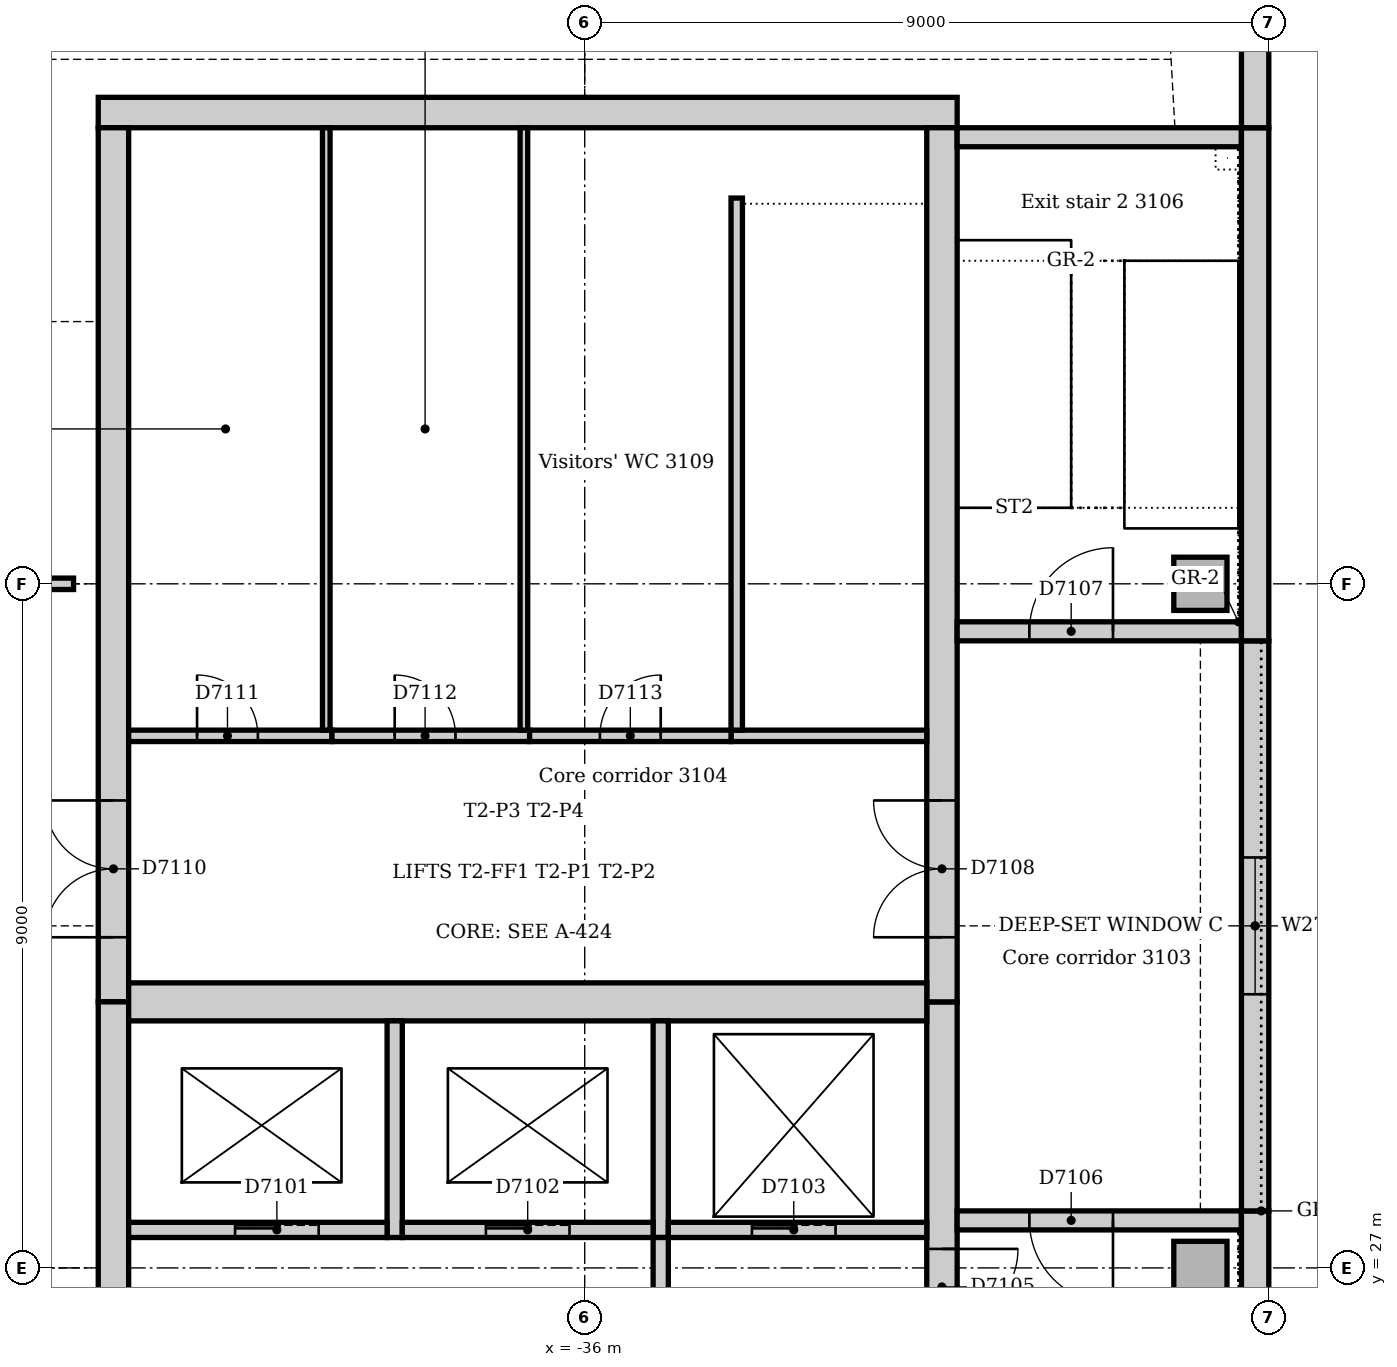
"""IFC4 building model, lengths in metres.
Left out: names, types, materials, properties, quantities, classifications, styles, units other than length and angle.
Written with IfcOpenShell. Run it as: python <this file> out.ifc"""

import sys

from ifc_helpers import new_model, si_unit, direction, frame, frame_2d, origin, origin_2d, place, context, subcontext, project, spatial, rectangle, extrude, element, fill, save


model = new_model("IFC4")
c1 = context("Model", 3, precision=1e-05, world=origin(), true_north=direction((0.0, 1.0)))
c2 = subcontext(c1, "Body", "Model", "MODEL_VIEW")
j1 = project(units=[si_unit("LENGTHUNIT", "METRE"), si_unit("PLANEANGLEUNIT", "RADIAN")], contexts=[c1])
p1 = place(None, origin())
s1 = spatial("IfcSite", under=j1, at=p1, CompositionType="ELEMENT")
p2 = place(p1, origin())
s2 = spatial("IfcBuilding", under=s1, at=p2, CompositionType="ELEMENT")
p3 = place(p2, frame((0.0, 0.0, 132.0)))
s3 = spatial("IfcBuildingStorey", under=s2, at=p3, CompositionType="ELEMENT", Elevation=132.0)
p4 = place(p3, frame((-31.1, 42.2, 0.0), z_axis=(0.0, 0.0, 1.0), x_axis=(-1.0, 0.0, 0.0)))
e1 = element("IfcWall", 1, at=p4, inside=s3, PredefinedType="SOLIDWALL", context=c2, shape_type="SweptSolid", body=[
    extrude(rectangle(XDim=11.3, YDim=0.4, at=frame_2d((5.65, 0.0))), origin(), (0.0, 0.0, 1.0), 4.0),
])
p5 = place(p3, frame((-31.3, 21.0, 0.0), z_axis=(0.0, 0.0, 1.0), x_axis=(0.0, 1.0, 0.0)))
e2 = element("IfcWall", 2, at=p5, inside=s3, PredefinedType="SOLIDWALL", context=c2, shape_type="SweptSolid", body=[
    extrude(rectangle(XDim=9.5, YDim=0.4, at=frame_2d((4.75, 0.0))), origin(), (0.0, 0.0, 1.0), 4.0),
])
p6 = place(p5, frame((5.25, 0.0, 0.0)))
e3 = element("IfcOpeningElement", 3, at=p6, cuts=e2, PredefinedType="OPENING", context=c2, shape_type="SweptSolid", body=[
    extrude(rectangle(XDim=1.0, YDim=2.1, at=frame_2d((0.5, 1.05))), frame((0.0, 0.21, 0.0), z_axis=(0.0, -1.0, 0.0), x_axis=(1.0, 0.0, 0.0)), (0.0, 0.0, 1.0), 0.42),
])
p7 = place(p3, frame((-31.3, 30.5, 0.0), z_axis=(0.0, 0.0, 1.0), x_axis=(0.0, 1.0, 0.0)))
e4 = element("IfcWall", 4, at=p7, inside=s3, PredefinedType="SOLIDWALL", context=c2, shape_type="SweptSolid", body=[
    extrude(rectangle(XDim=11.5, YDim=0.4, at=frame_2d((5.75, 0.0))), origin(), (0.0, 0.0, 1.0), 4.0),
])
p8 = place(p7, frame((0.85, 0.0, 0.0)))
e5 = element("IfcOpeningElement", 5, at=p8, cuts=e4, PredefinedType="OPENING", context=c2, shape_type="SweptSolid", body=[
    extrude(rectangle(XDim=1.8, YDim=2.1, at=frame_2d((0.9, 1.05))), frame((0.0, 0.21, 0.0), z_axis=(0.0, -1.0, 0.0), x_axis=(1.0, 0.0, 0.0)), (0.0, 0.0, 1.0), 0.42),
])
p9 = place(p3, frame((-42.2, 42.0, 0.0), z_axis=(0.0, 0.0, 1.0), x_axis=(0.0, -1.0, 0.0)))
e6 = element("IfcWall", 6, at=p9, inside=s3, PredefinedType="SOLIDWALL", context=c2, shape_type="SweptSolid", body=[
    extrude(rectangle(XDim=11.5, YDim=0.4, at=frame_2d((5.75, 0.0))), origin(), (0.0, 0.0, 1.0), 4.0),
])
p10 = place(p9, frame((8.85, 0.0, 0.0)))
e7 = element("IfcOpeningElement", 7, at=p10, cuts=e6, PredefinedType="OPENING", context=c2, shape_type="SweptSolid", body=[
    extrude(rectangle(XDim=1.8, YDim=2.1, at=frame_2d((0.9, 1.05))), frame((0.0, 0.21, 0.0), z_axis=(0.0, -1.0, 0.0), x_axis=(1.0, 0.0, 0.0)), (0.0, 0.0, 1.0), 0.42),
])
p11 = place(p3, frame((-42.2, 30.5, 0.0), z_axis=(0.0, 0.0, 1.0), x_axis=(0.0, -1.0, 0.0)))
e8 = element("IfcWall", 8, at=p11, inside=s3, PredefinedType="SOLIDWALL", context=c2, shape_type="SweptSolid", body=[
    extrude(rectangle(XDim=9.5, YDim=0.4, at=frame_2d((4.75, 0.0))), origin(), (0.0, 0.0, 1.0), 4.0),
])
p12 = place(p11, frame((3.85, 0.0, 0.0)))
e9 = element("IfcOpeningElement", 9, at=p12, cuts=e8, PredefinedType="OPENING", context=c2, shape_type="SweptSolid", body=[
    extrude(rectangle(XDim=1.8, YDim=2.1, at=frame_2d((0.9, 1.05))), frame((0.0, 0.21, 0.0), z_axis=(0.0, -1.0, 0.0), x_axis=(1.0, 0.0, 0.0)), (0.0, 0.0, 1.0), 0.42),
])
p13 = place(p3, frame((-42.0, 30.5, 0.0), z_axis=(0.0, 0.0, 1.0), x_axis=(1.0, 0.0, 0.0)))
e10 = element("IfcWall", 10, at=p13, inside=s3, PredefinedType="SOLIDWALL", context=c2, shape_type="SweptSolid", body=[
    extrude(rectangle(XDim=10.5, YDim=0.5, at=frame_2d((5.25, 0.0))), origin(), (0.0, 0.0, 1.0), 4.0),
])
p14 = place(p3, frame((-27.36, 27.625, 0.0), z_axis=(0.0, 0.0, 1.0), x_axis=(-1.0, 0.0, 0.0)))
e11 = element("IfcWall", 11, at=p14, inside=s3, PredefinedType="SOLIDWALL", context=c2, shape_type="SweptSolid", body=[
    extrude(rectangle(XDim=3.74, YDim=0.25, at=frame_2d((1.87, 0.0))), origin(), (0.0, 0.0, 1.0), 4.0),
])
p15 = place(p14, frame((1.69, 0.0, 0.0)))
e12 = element("IfcOpeningElement", 12, at=p15, cuts=e11, PredefinedType="OPENING", context=c2, shape_type="SweptSolid", body=[
    extrude(rectangle(XDim=1.1, YDim=2.1, at=frame_2d((0.55, 1.05))), frame((0.0, 0.135, 0.0), z_axis=(0.0, -1.0, 0.0), x_axis=(1.0, 0.0, 0.0)), (0.0, 0.0, 1.0), 0.27),
])
p16 = place(p3, frame((-31.1, 35.375, 0.0), z_axis=(0.0, 0.0, 1.0), x_axis=(1.0, 0.0, 0.0)))
e13 = element("IfcWall", 13, at=p16, inside=s3, PredefinedType="SOLIDWALL", context=c2, shape_type="SweptSolid", body=[
    extrude(rectangle(XDim=3.74, YDim=0.25, at=frame_2d((1.87, 0.0))), origin(), (0.0, 0.0, 1.0), 4.0),
])
p17 = place(p16, frame((0.95, 0.0, 0.0)))
e14 = element("IfcOpeningElement", 14, at=p17, cuts=e13, PredefinedType="OPENING", context=c2, shape_type="SweptSolid", body=[
    extrude(rectangle(XDim=1.1, YDim=2.1, at=frame_2d((0.55, 1.05))), frame((0.0, 0.135, 0.0), z_axis=(0.0, -1.0, 0.0), x_axis=(1.0, 0.0, 0.0)), (0.0, 0.0, 1.0), 0.27),
])
p18 = place(p3, frame((-27.36, 41.875, 0.0), z_axis=(0.0, 0.0, 1.0), x_axis=(-1.0, 0.0, 0.0)))
e15 = element("IfcWall", 15, at=p18, inside=s3, PredefinedType="SOLIDWALL", context=c2, shape_type="SweptSolid", body=[
    extrude(rectangle(XDim=3.74, YDim=0.25, at=frame_2d((1.87, 0.0))), origin(), (0.0, 0.0, 1.0), 4.0),
])
for number, where, z_axis, x_axis in (
    (16, (-27.9, 27.0, 0.0), (0.0, 0.0, 1.0), (1.0, 0.0, 0.0)),
    (17, (-27.9, 36.0, 0.0), (0.0, 0.0, 1.0), (1.0, 0.0, 0.0)),
):
    element("IfcColumn", number, at=place(p3, frame(where, z_axis=z_axis, x_axis=x_axis)), inside=s3, PredefinedType="COLUMN", context=c2, shape_type="SweptSolid", body=[
        extrude(rectangle(XDim=0.7, YDim=0.7, at=origin_2d()), origin(), (0.0, 0.0, 1.0), 4.0),
    ])
p19 = place(p3, frame((-27.18, 21.0, 0.0), z_axis=(0.0, 0.0, 1.0), x_axis=(0.0, 1.0, 0.0)))
e18 = element("IfcWall", 18, at=p19, inside=s3, PredefinedType="STANDARD", context=c2, shape_type="SweptSolid", body=[
    extrude(rectangle(XDim=6.75, YDim=0.36, at=frame_2d((3.375, 0.0))), origin(), (0.0, 0.0, 1.0), 3.85),
])
p20 = place(p3, frame((-27.18, 27.75, 0.0), z_axis=(0.0, 0.0, 1.0), x_axis=(0.0, 1.0, 0.0)))
e19 = element("IfcWall", 19, at=p20, inside=s3, PredefinedType="STANDARD", context=c2, shape_type="SweptSolid", body=[
    extrude(rectangle(XDim=7.5, YDim=0.36, at=frame_2d((3.75, 0.0))), origin(), (0.0, 0.0, 1.0), 3.85),
])
p21 = place(p20, frame((2.85, 0.0, 1.2)))
e20 = element("IfcOpeningElement", 20, at=p21, cuts=e19, PredefinedType="OPENING", context=c2, shape_type="SweptSolid", body=[
    extrude(rectangle(XDim=1.8, YDim=1.2, at=frame_2d((0.9, 0.6))), frame((0.0, 0.19, 0.0), z_axis=(0.0, -1.0, 0.0), x_axis=(1.0, 0.0, 0.0)), (0.0, 0.0, 1.0), 0.38),
])
p22 = place(p3, frame((-27.18, 35.25, 0.0), z_axis=(0.0, 0.0, 1.0), x_axis=(0.0, 1.0, 0.0)))
e21 = element("IfcWall", 21, at=p22, inside=s3, PredefinedType="STANDARD", context=c2, shape_type="SweptSolid", body=[
    extrude(rectangle(XDim=6.75, YDim=0.36, at=frame_2d((3.375, 0.0))), origin(), (0.0, 0.0, 1.0), 3.85),
])
p23 = place(p3, frame((-27.18, 42.0, 0.0), z_axis=(0.0, 0.0, 1.0), x_axis=(0.0, 1.0, 0.0)))
e22 = element("IfcWall", 22, at=p23, inside=s3, PredefinedType="STANDARD", context=c2, shape_type="SweptSolid", body=[
    extrude(rectangle(XDim=3.257, YDim=0.36, at=frame_2d((1.629, 0.0))), origin(), (0.0, 0.0, 1.0), 3.85),
])
p24 = place(p3, frame((-38.5, 27.4, 0.0), z_axis=(0.0, 0.0, 1.0), x_axis=(0.0, 1.0, 0.0)))
e23 = element("IfcWall", 23, at=p24, inside=s3, PredefinedType="SOLIDWALL", context=c2, shape_type="SweptSolid", body=[
    extrude(rectangle(XDim=2.85, YDim=0.2, at=frame_2d((1.425, 0.0))), origin(), (0.0, 0.0, 1.0), 4.0),
])
p25 = place(p3, frame((-42.0, 27.5, 0.0), z_axis=(0.0, 0.0, 1.0), x_axis=(1.0, 0.0, 0.0)))
e24 = element("IfcWall", 24, at=p25, inside=s3, PredefinedType="SOLIDWALL", context=c2, shape_type="SweptSolid", body=[
    extrude(rectangle(XDim=3.4, YDim=0.2, at=frame_2d((1.7, 0.0))), origin(), (0.0, 0.0, 1.0), 4.0),
])
p26 = place(p25, frame((1.4, 0.0, 0.0)))
e25 = element("IfcOpeningElement", 25, at=p26, cuts=e24, PredefinedType="OPENING", context=c2, shape_type="SweptSolid", body=[
    extrude(rectangle(XDim=1.1, YDim=2.1, at=frame_2d((0.55, 1.05))), frame((0.0, 0.11, 0.0), z_axis=(0.0, -1.0, 0.0), x_axis=(1.0, 0.0, 0.0)), (0.0, 0.0, 1.0), 0.22),
])
p27 = place(p3, frame((-35.0, 27.4, 0.0), z_axis=(0.0, 0.0, 1.0), x_axis=(0.0, 1.0, 0.0)))
e26 = element("IfcWall", 26, at=p27, inside=s3, PredefinedType="SOLIDWALL", context=c2, shape_type="SweptSolid", body=[
    extrude(rectangle(XDim=2.85, YDim=0.2, at=frame_2d((1.425, 0.0))), origin(), (0.0, 0.0, 1.0), 4.0),
])
p28 = place(p3, frame((-38.4, 27.5, 0.0), z_axis=(0.0, 0.0, 1.0), x_axis=(1.0, 0.0, 0.0)))
e27 = element("IfcWall", 27, at=p28, inside=s3, PredefinedType="SOLIDWALL", context=c2, shape_type="SweptSolid", body=[
    extrude(rectangle(XDim=3.3, YDim=0.2, at=frame_2d((1.65, 0.0))), origin(), (0.0, 0.0, 1.0), 4.0),
])
p29 = place(p28, frame((1.1, 0.0, 0.0)))
e28 = element("IfcOpeningElement", 28, at=p29, cuts=e27, PredefinedType="OPENING", context=c2, shape_type="SweptSolid", body=[
    extrude(rectangle(XDim=1.1, YDim=2.1, at=frame_2d((0.55, 1.05))), frame((0.0, 0.11, 0.0), z_axis=(0.0, -1.0, 0.0), x_axis=(1.0, 0.0, 0.0)), (0.0, 0.0, 1.0), 0.22),
])
p30 = place(p3, frame((-34.9, 27.5, 0.0), z_axis=(0.0, 0.0, 1.0), x_axis=(1.0, 0.0, 0.0)))
e29 = element("IfcWall", 29, at=p30, inside=s3, PredefinedType="SOLIDWALL", context=c2, shape_type="SweptSolid", body=[
    extrude(rectangle(XDim=3.4, YDim=0.2, at=frame_2d((1.7, 0.0))), origin(), (0.0, 0.0, 1.0), 4.0),
])
p31 = place(p30, frame((1.1, 0.0, 0.0)))
e30 = element("IfcOpeningElement", 30, at=p31, cuts=e29, PredefinedType="OPENING", context=c2, shape_type="SweptSolid", body=[
    extrude(rectangle(XDim=1.1, YDim=2.1, at=frame_2d((0.55, 1.05))), frame((0.0, 0.11, 0.0), z_axis=(0.0, -1.0, 0.0), x_axis=(1.0, 0.0, 0.0)), (0.0, 0.0, 1.0), 0.22),
])
p32 = place(p3, frame((-35.0, 24.1, 0.0), z_axis=(0.0, 0.0, 1.0), x_axis=(0.0, 1.0, 0.0)))
e31 = element("IfcWall", 31, at=p32, inside=s3, PredefinedType="SOLIDWALL", context=c2, shape_type="SweptSolid", body=[
    extrude(rectangle(XDim=3.3, YDim=0.2, at=frame_2d((1.65, 0.0))), origin(), (0.0, 0.0, 1.0), 4.0),
])
p33 = place(p32, frame((1.15, 0.0, 0.0)))
e32 = element("IfcOpeningElement", 32, at=p33, cuts=e31, PredefinedType="OPENING", context=c2, shape_type="SweptSolid", body=[
    extrude(rectangle(XDim=1.0, YDim=2.1, at=frame_2d((0.5, 1.05))), frame((0.0, 0.11, 0.0), z_axis=(0.0, -1.0, 0.0), x_axis=(1.0, 0.0, 0.0)), (0.0, 0.0, 1.0), 0.22),
])
p34 = place(p3, frame((-34.075, 34.0, 0.0), z_axis=(0.0, 0.0, 1.0), x_axis=(1.0, 0.0, 0.0)))
e33 = element("IfcWall", 33, at=p34, inside=s3, PredefinedType="SOLIDWALL", context=c2, shape_type="SweptSolid", body=[
    extrude(rectangle(XDim=2.575, YDim=0.15, at=frame_2d((1.288, 0.0))), origin(), (0.0, 0.0, 1.0), 4.0),
])
p35 = place(p3, frame((-34.0, 41.075, 0.0), z_axis=(0.0, 0.0, 1.0), x_axis=(0.0, -1.0, 0.0)))
e34 = element("IfcWall", 34, at=p35, inside=s3, PredefinedType="SOLIDWALL", context=c2, shape_type="SweptSolid", body=[
    extrude(rectangle(XDim=7.0, YDim=0.15, at=frame_2d((3.5, 0.0))), origin(), (0.0, 0.0, 1.0), 4.0),
])
p36 = place(p3, frame((-39.325, 34.0, 0.0), z_axis=(0.0, 0.0, 1.0), x_axis=(-1.0, 0.0, 0.0)))
e35 = element("IfcWall", 35, at=p36, inside=s3, PredefinedType="PARTITIONING", context=c2, shape_type="SweptSolid", body=[
    extrude(rectangle(XDim=2.675, YDim=0.15, at=frame_2d((1.337, 0.0))), origin(), (0.0, 0.0, 1.0), 3.85),
])
p37 = place(p36, frame((0.975, 0.0, 0.0)))
e36 = element("IfcOpeningElement", 36, at=p37, cuts=e35, PredefinedType="OPENING", context=c2, shape_type="SweptSolid", body=[
    extrude(rectangle(XDim=0.8, YDim=2.1, at=frame_2d((0.4, 1.05))), frame((0.0, 0.085, 0.0), z_axis=(0.0, -1.0, 0.0), x_axis=(1.0, 0.0, 0.0)), (0.0, 0.0, 1.0), 0.17),
])
p38 = place(p3, frame((-36.725, 34.0, 0.0), z_axis=(0.0, 0.0, 1.0), x_axis=(-1.0, 0.0, 0.0)))
e37 = element("IfcWall", 37, at=p38, inside=s3, PredefinedType="PARTITIONING", context=c2, shape_type="SweptSolid", body=[
    extrude(rectangle(XDim=2.6, YDim=0.15, at=frame_2d((1.3, 0.0))), origin(), (0.0, 0.0, 1.0), 3.85),
])
p39 = place(p38, frame((0.975, 0.0, 0.0)))
e38 = element("IfcOpeningElement", 38, at=p39, cuts=e37, PredefinedType="OPENING", context=c2, shape_type="SweptSolid", body=[
    extrude(rectangle(XDim=0.8, YDim=2.1, at=frame_2d((0.4, 1.05))), frame((0.0, 0.085, 0.0), z_axis=(0.0, -1.0, 0.0), x_axis=(1.0, 0.0, 0.0)), (0.0, 0.0, 1.0), 0.17),
])
p40 = place(p3, frame((-34.075, 34.0, 0.0), z_axis=(0.0, 0.0, 1.0), x_axis=(-1.0, 0.0, 0.0)))
e39 = element("IfcWall", 39, at=p40, inside=s3, PredefinedType="PARTITIONING", context=c2, shape_type="SweptSolid", body=[
    extrude(rectangle(XDim=2.65, YDim=0.15, at=frame_2d((1.325, 0.0))), origin(), (0.0, 0.0, 1.0), 3.85),
])
p41 = place(p40, frame((0.925, 0.0, 0.0)))
e40 = element("IfcOpeningElement", 40, at=p41, cuts=e39, PredefinedType="OPENING", context=c2, shape_type="SweptSolid", body=[
    extrude(rectangle(XDim=0.8, YDim=2.1, at=frame_2d((0.4, 1.05))), frame((0.0, 0.085, 0.0), z_axis=(0.0, -1.0, 0.0), x_axis=(1.0, 0.0, 0.0)), (0.0, 0.0, 1.0), 0.17),
])
for number, where, z_axis, x_axis in (
    (41, (-39.4, 34.075, 0.0), (0.0, 0.0, 1.0), (0.0, 1.0, 0.0)),
    (42, (-36.8, 34.075, 0.0), (0.0, 0.0, 1.0), (0.0, 1.0, 0.0)),
):
    element("IfcWall", number, at=place(p3, frame(where, z_axis=z_axis, x_axis=x_axis)), inside=s3, PredefinedType="PARTITIONING", context=c2, shape_type="SweptSolid", body=[
        extrude(rectangle(XDim=7.925, YDim=0.1, at=frame_2d((3.962, 0.0))), origin(), (0.0, 0.0, 1.0), 3.85),
    ])
p42 = place(p3, frame((-44.7, 36.0, 0.0), z_axis=(0.0, 0.0, 1.0), x_axis=(1.0, 0.0, 0.0)))
e43 = element("IfcWall", 43, at=p42, inside=s3, PredefinedType="PARTITIONING", context=c2, shape_type="SweptSolid", body=[
    extrude(rectangle(XDim=1.975, YDim=0.15, at=frame_2d((0.988, 0.0))), origin(), (0.0, 0.0, 1.0), 3.602),
])
p43 = place(p42, frame((0.55, 0.0, 0.0)))
e44 = element("IfcOpeningElement", 44, at=p43, cuts=e43, PredefinedType="OPENING", context=c2, shape_type="SweptSolid", body=[
    extrude(rectangle(XDim=0.9, YDim=2.1, at=frame_2d((0.45, 1.05))), frame((0.0, 0.085, 0.0), z_axis=(0.0, -1.0, 0.0), x_axis=(1.0, 0.0, 0.0)), (0.0, 0.0, 1.0), 0.17),
])
p44 = place(p21, origin())
e45 = element("IfcWindow", 45, at=p44, inside=s3, PartitioningType="SINGLE_PANEL", PredefinedType="WINDOW", context=c2, shape_type="SweptSolid", body=[
    extrude(rectangle(XDim=1.8, YDim=1.2, at=frame_2d((0.9, 0.6))), frame((0.0, 0.13, 0.0), z_axis=(0.0, -1.0, 0.0), x_axis=(1.0, 0.0, 0.0)), (0.0, 0.0, 1.0), 0.06),
])
fill(e20, e45)
p45 = place(p26, origin())
e46 = element("IfcDoor", 46, at=p45, inside=s3, OperationType="SLIDING_TO_LEFT", PredefinedType="DOOR", context=c2, shape_type="SweptSolid", body=[
    extrude(rectangle(XDim=1.1, YDim=2.1, at=frame_2d((0.55, 1.05))), frame((0.0, 0.025, 0.0), z_axis=(0.0, -1.0, 0.0), x_axis=(1.0, 0.0, 0.0)), (0.0, 0.0, 1.0), 0.05),
])
fill(e25, e46)
p46 = place(p29, origin())
e47 = element("IfcDoor", 47, at=p46, inside=s3, OperationType="SLIDING_TO_LEFT", PredefinedType="DOOR", context=c2, shape_type="SweptSolid", body=[
    extrude(rectangle(XDim=1.1, YDim=2.1, at=frame_2d((0.55, 1.05))), frame((0.0, 0.025, 0.0), z_axis=(0.0, -1.0, 0.0), x_axis=(1.0, 0.0, 0.0)), (0.0, 0.0, 1.0), 0.05),
])
fill(e28, e47)
p47 = place(p31, origin())
e48 = element("IfcDoor", 48, at=p47, inside=s3, OperationType="SLIDING_TO_LEFT", PredefinedType="DOOR", context=c2, shape_type="SweptSolid", body=[
    extrude(rectangle(XDim=1.1, YDim=2.1, at=frame_2d((0.55, 1.05))), frame((0.0, 0.025, 0.0), z_axis=(0.0, -1.0, 0.0), x_axis=(1.0, 0.0, 0.0)), (0.0, 0.0, 1.0), 0.05),
])
fill(e30, e48)
p48 = place(p6, frame((1.0, 0.0, 0.0), z_axis=(0.0, 0.0, 1.0), x_axis=(-1.0, 0.0, 0.0)))
e49 = element("IfcDoor", 49, at=p48, inside=s3, OperationType="SINGLE_SWING_LEFT", PredefinedType="DOOR", context=c2, shape_type="SweptSolid", body=[
    extrude(rectangle(XDim=1.0, YDim=2.1, at=frame_2d((0.5, 1.05))), frame((0.0, 0.025, 0.0), z_axis=(0.0, -1.0, 0.0), x_axis=(1.0, 0.0, 0.0)), (0.0, 0.0, 1.0), 0.05),
])
fill(e3, e49)
p49 = place(p15, origin())
e50 = element("IfcDoor", 50, at=p49, inside=s3, OperationType="SINGLE_SWING_LEFT", PredefinedType="DOOR", context=c2, shape_type="SweptSolid", body=[
    extrude(rectangle(XDim=1.1, YDim=2.1, at=frame_2d((0.55, 1.05))), frame((0.0, 0.025, 0.0), z_axis=(0.0, -1.0, 0.0), x_axis=(1.0, 0.0, 0.0)), (0.0, 0.0, 1.0), 0.05),
])
fill(e12, e50)
p50 = place(p17, origin())
e51 = element("IfcDoor", 51, at=p50, inside=s3, OperationType="SINGLE_SWING_RIGHT", PredefinedType="DOOR", context=c2, shape_type="SweptSolid", body=[
    extrude(rectangle(XDim=1.1, YDim=2.1, at=frame_2d((0.55, 1.05))), frame((0.0, 0.025, 0.0), z_axis=(0.0, -1.0, 0.0), x_axis=(1.0, 0.0, 0.0)), (0.0, 0.0, 1.0), 0.05),
])
fill(e14, e51)
p51 = place(p8, origin())
e52 = element("IfcDoor", 52, at=p51, inside=s3, OperationType="DOUBLE_DOOR_SINGLE_SWING", PredefinedType="DOOR", context=c2, shape_type="SweptSolid", body=[
    extrude(rectangle(XDim=1.8, YDim=2.1, at=frame_2d((0.9, 1.05))), frame((0.0, 0.025, 0.0), z_axis=(0.0, -1.0, 0.0), x_axis=(1.0, 0.0, 0.0)), (0.0, 0.0, 1.0), 0.05),
])
fill(e5, e52)
p52 = place(p10, frame((1.8, 0.0, 0.0), z_axis=(0.0, 0.0, 1.0), x_axis=(-1.0, 0.0, 0.0)))
e53 = element("IfcDoor", 53, at=p52, inside=s3, OperationType="DOUBLE_DOOR_SINGLE_SWING", PredefinedType="DOOR", context=c2, shape_type="SweptSolid", body=[
    extrude(rectangle(XDim=1.8, YDim=2.1, at=frame_2d((0.9, 1.05))), frame((0.0, 0.025, 0.0), z_axis=(0.0, -1.0, 0.0), x_axis=(1.0, 0.0, 0.0)), (0.0, 0.0, 1.0), 0.05),
])
fill(e7, e53)
p53 = place(p37, frame((0.8, 0.0, 0.0), z_axis=(0.0, 0.0, 1.0), x_axis=(-1.0, 0.0, 0.0)))
e54 = element("IfcDoor", 54, at=p53, inside=s3, OperationType="SINGLE_SWING_LEFT", PredefinedType="DOOR", context=c2, shape_type="SweptSolid", body=[
    extrude(rectangle(XDim=0.8, YDim=2.1, at=frame_2d((0.4, 1.05))), frame((0.0, 0.025, 0.0), z_axis=(0.0, -1.0, 0.0), x_axis=(1.0, 0.0, 0.0)), (0.0, 0.0, 1.0), 0.05),
])
fill(e36, e54)
p54 = place(p39, frame((0.8, 0.0, 0.0), z_axis=(0.0, 0.0, 1.0), x_axis=(-1.0, 0.0, 0.0)))
e55 = element("IfcDoor", 55, at=p54, inside=s3, OperationType="SINGLE_SWING_LEFT", PredefinedType="DOOR", context=c2, shape_type="SweptSolid", body=[
    extrude(rectangle(XDim=0.8, YDim=2.1, at=frame_2d((0.4, 1.05))), frame((0.0, 0.025, 0.0), z_axis=(0.0, -1.0, 0.0), x_axis=(1.0, 0.0, 0.0)), (0.0, 0.0, 1.0), 0.05),
])
fill(e38, e55)
p55 = place(p41, frame((0.8, 0.0, 0.0), z_axis=(0.0, 0.0, 1.0), x_axis=(-1.0, 0.0, 0.0)))
e56 = element("IfcDoor", 56, at=p55, inside=s3, OperationType="SINGLE_SWING_RIGHT", PredefinedType="DOOR", context=c2, shape_type="SweptSolid", body=[
    extrude(rectangle(XDim=0.8, YDim=2.1, at=frame_2d((0.4, 1.05))), frame((0.0, 0.025, 0.0), z_axis=(0.0, -1.0, 0.0), x_axis=(1.0, 0.0, 0.0)), (0.0, 0.0, 1.0), 0.05),
])
fill(e40, e56)
save(model, sys.argv[1])
